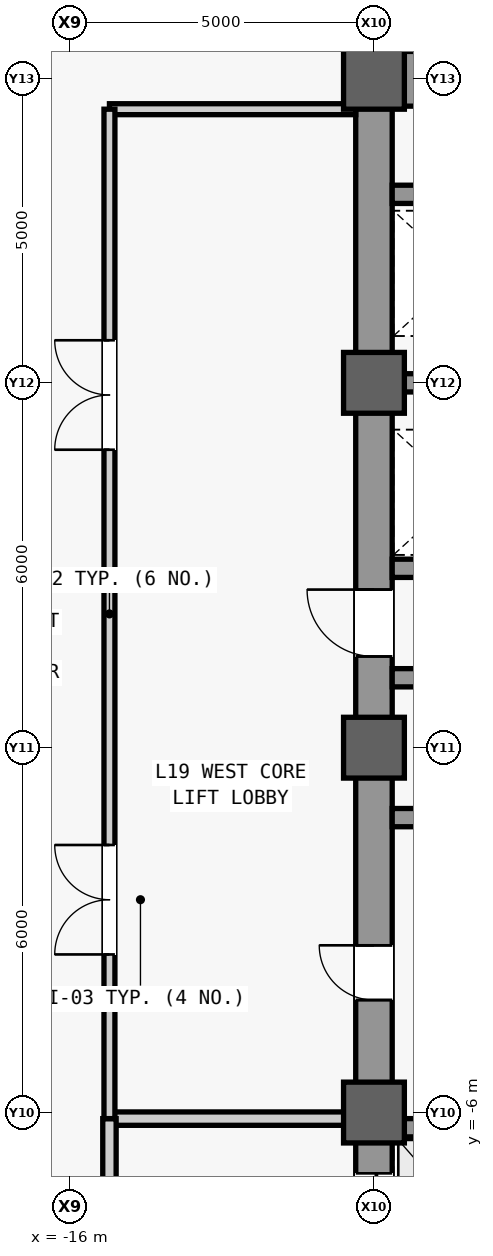
"""IFC4 building model, lengths in metres.
Left out: names, types, materials, properties, quantities, classifications, styles, units other than length and angle.
Written with IfcOpenShell. Run it as: python <this file> out.ifc"""

import sys

from ifc_helpers import new_model, si_unit, direction, frame, frame_2d, origin, origin_2d, place, context, subcontext, project, spatial, rectangle, extrude, source, transform, mapped, element, fill, save


model = new_model("IFC4")
c1 = context("Model", 3, precision=1e-05, world=origin(), true_north=direction((0.0, 1.0)))
c2 = subcontext(c1, "Body", "Model", "MODEL_VIEW")
j1 = project(units=[si_unit("LENGTHUNIT", "METRE"), si_unit("PLANEANGLEUNIT", "RADIAN")], contexts=[c1])
p1 = place(None, origin())
s1 = spatial("IfcSite", under=j1, at=p1, CompositionType="ELEMENT")
p2 = place(p1, origin())
s2 = spatial("IfcBuilding", under=s1, at=p2, CompositionType="ELEMENT")
p3 = place(p2, frame((0.0, 0.0, 87.2)))
s3 = spatial("IfcBuildingStorey", under=s2, at=p3, CompositionType="ELEMENT", Elevation=87.2)
m1 = source(origin(), c2, "Body", "SweptSolid", [
    extrude(rectangle(XDim=22.0, YDim=0.6, at=frame_2d((11.0, 0.0))), origin(), (0.0, 0.0, 1.0), 3.94),
])
p4 = place(p3, frame((-11.0, -11.0, 0.0), z_axis=(0.0, 0.0, 1.0), x_axis=(0.0, 1.0, 0.0)))
e1 = element("IfcWall", 1, at=p4, inside=s3, PredefinedType="SHEAR", context=c2, shape_type="MappedRepresentation", body=[
    mapped(m1, transform((0.0, 0.0, 0.0), scale=1.0)),
])
m2 = source(origin(), c2, "Body", "SweptSolid", [
    extrude(rectangle(XDim=1.1, YDim=2.2, at=frame_2d((0.55, 1.1))), frame((0.0, 0.31, 0.0), z_axis=(0.0, -1.0, 0.0), x_axis=(1.0, 0.0, 0.0)), (0.0, 0.0, 1.0), 0.62),
])
p5 = place(p4, frame((0.8, 0.0, 0.0)))
e2 = element("IfcOpeningElement", 2, at=p5, cuts=e1, PredefinedType="OPENING", context=c2, shape_type="MappedRepresentation", body=[
    mapped(m2, transform((0.0, 0.0, 0.0), scale=1.0)),
])
p6 = place(p4, frame((12.5, 0.0, 0.0)))
e3 = element("IfcOpeningElement", 3, at=p6, cuts=e1, PredefinedType="OPENING", context=c2, shape_type="MappedRepresentation", body=[
    mapped(m2, transform((0.0, 0.0, 0.0), scale=1.0)),
])
m3 = source(origin(), c2, "Body", "SweptSolid", [
    extrude(rectangle(XDim=0.9, YDim=2.15, at=frame_2d((0.45, 1.075))), frame((0.0, 0.31, 0.0), z_axis=(0.0, -1.0, 0.0), x_axis=(1.0, 0.0, 0.0)), (0.0, 0.0, 1.0), 0.62),
])
p7 = place(p4, frame((6.85, 0.0, 0.0)))
e4 = element("IfcOpeningElement", 4, at=p7, cuts=e1, PredefinedType="OPENING", context=c2, shape_type="MappedRepresentation", body=[
    mapped(m3, transform((0.0, 0.0, 0.0), scale=1.0)),
])
m4 = source(origin(), c2, "Body", "SweptSolid", [
    extrude(rectangle(XDim=1.3, YDim=2.3, at=frame_2d((0.65, 1.15))), frame((0.0, 0.31, 0.0), z_axis=(0.0, -1.0, 0.0), x_axis=(1.0, 0.0, 0.0)), (0.0, 0.0, 1.0), 0.62),
])
p8 = place(p4, frame((2.7, 0.0, 0.0)))
e5 = element("IfcOpeningElement", 5, at=p8, cuts=e1, PredefinedType="OPENING", context=c2, shape_type="MappedRepresentation", body=[
    mapped(m4, transform((0.0, 0.0, 0.0), scale=1.0)),
])
m5 = source(origin(), c2, "Body", "SweptSolid", [
    extrude(rectangle(XDim=5.85, YDim=0.9, at=frame_2d((2.925, 0.0))), origin(), (0.0, 0.0, 1.0), 3.94),
])
p9 = place(p3, frame((-10.7, 11.0, 0.0), z_axis=(0.0, 0.0, 1.0), x_axis=(1.0, 0.0, 0.0)))
e6 = element("IfcWall", 6, at=p9, inside=s3, PredefinedType="SHEAR", context=c2, shape_type="MappedRepresentation", body=[
    mapped(m5, transform((0.0, 0.0, 0.0), scale=1.0)),
])
m6 = source(origin(), c2, "Body", "SweptSolid", [
    extrude(rectangle(XDim=5.6, YDim=0.3, at=frame_2d((2.8, 0.0))), origin(), (0.0, 0.0, 1.0), 3.94),
])
for number, where, z_axis, x_axis in (
    (7, (-10.7, -1.15, 0.0), (0.0, 0.0, 1.0), (1.0, 0.0, 0.0)),
    (8, (-10.7, 1.15, 0.0), (0.0, 0.0, 1.0), (1.0, 0.0, 0.0)),
):
    element("IfcWall", number, at=place(p3, frame(where, z_axis=z_axis, x_axis=x_axis)), inside=s3, PredefinedType="SHEAR", context=c2, shape_type="MappedRepresentation", body=[
        mapped(m6, transform((0.0, 0.0, 0.0), scale=1.0)),
    ])
m7 = source(origin(), c2, "Body", "SweptSolid", [
    extrude(rectangle(XDim=1.0, YDim=1.0, at=origin_2d()), origin(), (0.0, 0.0, 1.0), 4.2),
])
for number, where, z_axis, x_axis in (
    (9, (-11.0, -6.0, 0.0), (0.0, 0.0, 1.0), (1.0, 0.0, 0.0)),
    (10, (-11.0, 0.0, 0.0), (0.0, 0.0, 1.0), (1.0, 0.0, 0.0)),
    (11, (-11.0, 6.0, 0.0), (0.0, 0.0, 1.0), (1.0, 0.0, 0.0)),
    (12, (-11.0, 11.0, 0.0), (0.0, 0.0, 1.0), (1.0, 0.0, 0.0)),
):
    element("IfcColumn", number, at=place(p3, frame(where, z_axis=z_axis, x_axis=x_axis)), inside=s3, PredefinedType="COLUMN", context=c2, shape_type="MappedRepresentation", body=[
        mapped(m7, transform((0.0, 0.0, 0.0), scale=1.0)),
    ])
m8 = source(origin(), c2, "Body", "SweptSolid", [
    extrude(rectangle(XDim=2.2, YDim=0.3, at=frame_2d((1.1, 0.0))), origin(), (0.0, 0.0, 1.0), 3.94),
])
for number, where, z_axis, x_axis in (
    (13, (-10.7, -6.25, 0.0), (0.0, 0.0, 1.0), (1.0, 0.0, 0.0)),
    (14, (-10.7, 2.95, 0.0), (0.0, 0.0, 1.0), (1.0, 0.0, 0.0)),
    (15, (-10.7, 6.0, 0.0), (0.0, 0.0, 1.0), (1.0, 0.0, 0.0)),
    (16, (-10.7, 9.1, 0.0), (0.0, 0.0, 1.0), (1.0, 0.0, 0.0)),
):
    element("IfcWall", number, at=place(p3, frame(where, z_axis=z_axis, x_axis=x_axis)), inside=s3, PredefinedType="SHEAR", context=c2, shape_type="MappedRepresentation", body=[
        mapped(m8, transform((0.0, 0.0, 0.0), scale=1.0)),
    ])
m9 = source(origin(), c2, "Body", "SweptSolid", [
    extrude(rectangle(XDim=4.05, YDim=0.22, at=frame_2d((2.025, 0.0))), origin(), (0.0, 0.0, 1.0), 2.54),
])
p10 = place(p3, frame((-15.35, -6.1, 0.0), z_axis=(0.0, 0.0, 1.0), x_axis=(1.0, 0.0, 0.0)))
e17 = element("IfcWall", 17, at=p10, inside=s3, PredefinedType="PARTITIONING", context=c2, shape_type="MappedRepresentation", body=[
    mapped(m9, transform((0.0, 0.0, 0.0), scale=1.0)),
])
m10 = source(origin(), c2, "Body", "SweptSolid", [
    extrude(rectangle(XDim=4.4, YDim=0.22, at=frame_2d((2.2, 0.0))), origin(), (0.0, 0.0, 1.0), 3.94),
])
p11 = place(p3, frame((-15.35, -10.5, 0.0), z_axis=(0.0, 0.0, 1.0), x_axis=(0.0, 1.0, 0.0)))
e18 = element("IfcWall", 18, at=p11, inside=s3, PredefinedType="PARTITIONING", context=c2, shape_type="MappedRepresentation", body=[
    mapped(m10, transform((0.0, 0.0, 0.0), scale=1.0)),
])
m11 = source(origin(), c2, "Body", "SweptSolid", [
    extrude(rectangle(XDim=1.2, YDim=2.2, at=frame_2d((0.6, 1.1))), frame((0.0, 0.12, 0.0), z_axis=(0.0, -1.0, 0.0), x_axis=(1.0, 0.0, 0.0)), (0.0, 0.0, 1.0), 0.24),
])
p12 = place(p11, frame((1.6, 0.0, 0.0)))
e19 = element("IfcOpeningElement", 19, at=p12, cuts=e18, PredefinedType="OPENING", context=c2, shape_type="MappedRepresentation", body=[
    mapped(m11, transform((0.0, 0.0, 0.0), scale=1.0)),
])
m12 = source(origin(), c2, "Body", "SweptSolid", [
    extrude(rectangle(XDim=4.05, YDim=0.18, at=frame_2d((2.025, 0.0))), origin(), (0.0, 0.0, 1.0), 3.94),
])
p13 = place(p3, frame((-15.35, 10.5, 0.0), z_axis=(0.0, 0.0, 1.0), x_axis=(1.0, 0.0, 0.0)))
e20 = element("IfcWall", 20, at=p13, inside=s3, PredefinedType="PARTITIONING", context=c2, shape_type="MappedRepresentation", body=[
    mapped(m12, transform((0.0, 0.0, 0.0), scale=1.0)),
])
m13 = source(origin(), c2, "Body", "SweptSolid", [
    extrude(rectangle(XDim=16.6, YDim=0.18, at=frame_2d((8.3, 0.0))), origin(), (0.0, 0.0, 1.0), 3.94),
])
p14 = place(p3, frame((-15.35, -6.1, 0.0), z_axis=(0.0, 0.0, 1.0), x_axis=(0.0, 1.0, 0.0)))
e21 = element("IfcWall", 21, at=p14, inside=s3, PredefinedType="PARTITIONING", context=c2, shape_type="MappedRepresentation", body=[
    mapped(m13, transform((0.0, 0.0, 0.0), scale=1.0)),
])
m14 = source(origin(), c2, "Body", "SweptSolid", [
    extrude(rectangle(XDim=1.8, YDim=2.25, at=frame_2d((0.9, 1.125))), frame((0.0, 0.1, 0.0), z_axis=(0.0, -1.0, 0.0), x_axis=(1.0, 0.0, 0.0)), (0.0, 0.0, 1.0), 0.2),
])
p15 = place(p14, frame((2.7, 0.0, 0.0)))
e22 = element("IfcOpeningElement", 22, at=p15, cuts=e21, PredefinedType="OPENING", context=c2, shape_type="MappedRepresentation", body=[
    mapped(m14, transform((0.0, 0.0, 0.0), scale=1.0)),
])
p16 = place(p14, frame((11.0, 0.0, 0.0)))
e23 = element("IfcOpeningElement", 23, at=p16, cuts=e21, PredefinedType="OPENING", context=c2, shape_type="MappedRepresentation", body=[
    mapped(m14, transform((0.0, 0.0, 0.0), scale=1.0)),
])
m15 = source(origin(), c2, "Body", "SweptSolid", [
    extrude(rectangle(XDim=1.1, YDim=2.2, at=frame_2d((0.55, 1.1))), frame((0.0, 0.025, 0.0), z_axis=(0.0, -1.0, 0.0), x_axis=(1.0, 0.0, 0.0)), (0.0, 0.0, 1.0), 0.05),
])
p17 = place(p6, origin())
e24 = element("IfcDoor", 24, at=p17, inside=s3, OperationType="SINGLE_SWING_RIGHT", PredefinedType="DOOR", context=c2, shape_type="MappedRepresentation", body=[
    mapped(m15, transform((0.0, 0.0, 0.0), scale=1.0)),
])
fill(e3, e24)
m16 = source(origin(), c2, "Body", "SweptSolid", [
    extrude(rectangle(XDim=0.9, YDim=2.15, at=frame_2d((0.45, 1.075))), frame((0.0, 0.025, 0.0), z_axis=(0.0, -1.0, 0.0), x_axis=(1.0, 0.0, 0.0)), (0.0, 0.0, 1.0), 0.05),
])
p18 = place(p7, origin())
e25 = element("IfcDoor", 25, at=p18, inside=s3, OperationType="SINGLE_SWING_RIGHT", PredefinedType="DOOR", context=c2, shape_type="MappedRepresentation", body=[
    mapped(m16, transform((0.0, 0.0, 0.0), scale=1.0)),
])
fill(e4, e25)
m17 = source(origin(), c2, "Body", "SweptSolid", [
    extrude(rectangle(XDim=1.8, YDim=2.25, at=frame_2d((0.9, 1.125))), frame((0.0, 0.025, 0.0), z_axis=(0.0, -1.0, 0.0), x_axis=(1.0, 0.0, 0.0)), (0.0, 0.0, 1.0), 0.05),
])
p19 = place(p15, origin())
e26 = element("IfcDoor", 26, at=p19, inside=s3, OperationType="SINGLE_SWING_LEFT", PredefinedType="DOOR", context=c2, shape_type="MappedRepresentation", body=[
    mapped(m17, transform((0.0, 0.0, 0.0), scale=1.0)),
])
fill(e22, e26)
p20 = place(p16, origin())
e27 = element("IfcDoor", 27, at=p20, inside=s3, OperationType="SINGLE_SWING_RIGHT", PredefinedType="DOOR", context=c2, shape_type="MappedRepresentation", body=[
    mapped(m17, transform((0.0, 0.0, 0.0), scale=1.0)),
])
fill(e23, e27)
m18 = source(origin(), c2, "Body", "SweptSolid", [
    extrude(rectangle(XDim=1.3, YDim=2.3, at=frame_2d((0.65, 1.15))), frame((0.0, 0.025, 0.0), z_axis=(0.0, -1.0, 0.0), x_axis=(1.0, 0.0, 0.0)), (0.0, 0.0, 1.0), 0.05),
])
p21 = place(p8, origin())
e28 = element("IfcDoor", 28, at=p21, inside=s3, OperationType="SLIDING_TO_LEFT", PredefinedType="DOOR", context=c2, shape_type="MappedRepresentation", body=[
    mapped(m18, transform((0.0, 0.0, 0.0), scale=1.0)),
])
fill(e5, e28)
save(model, sys.argv[1])
